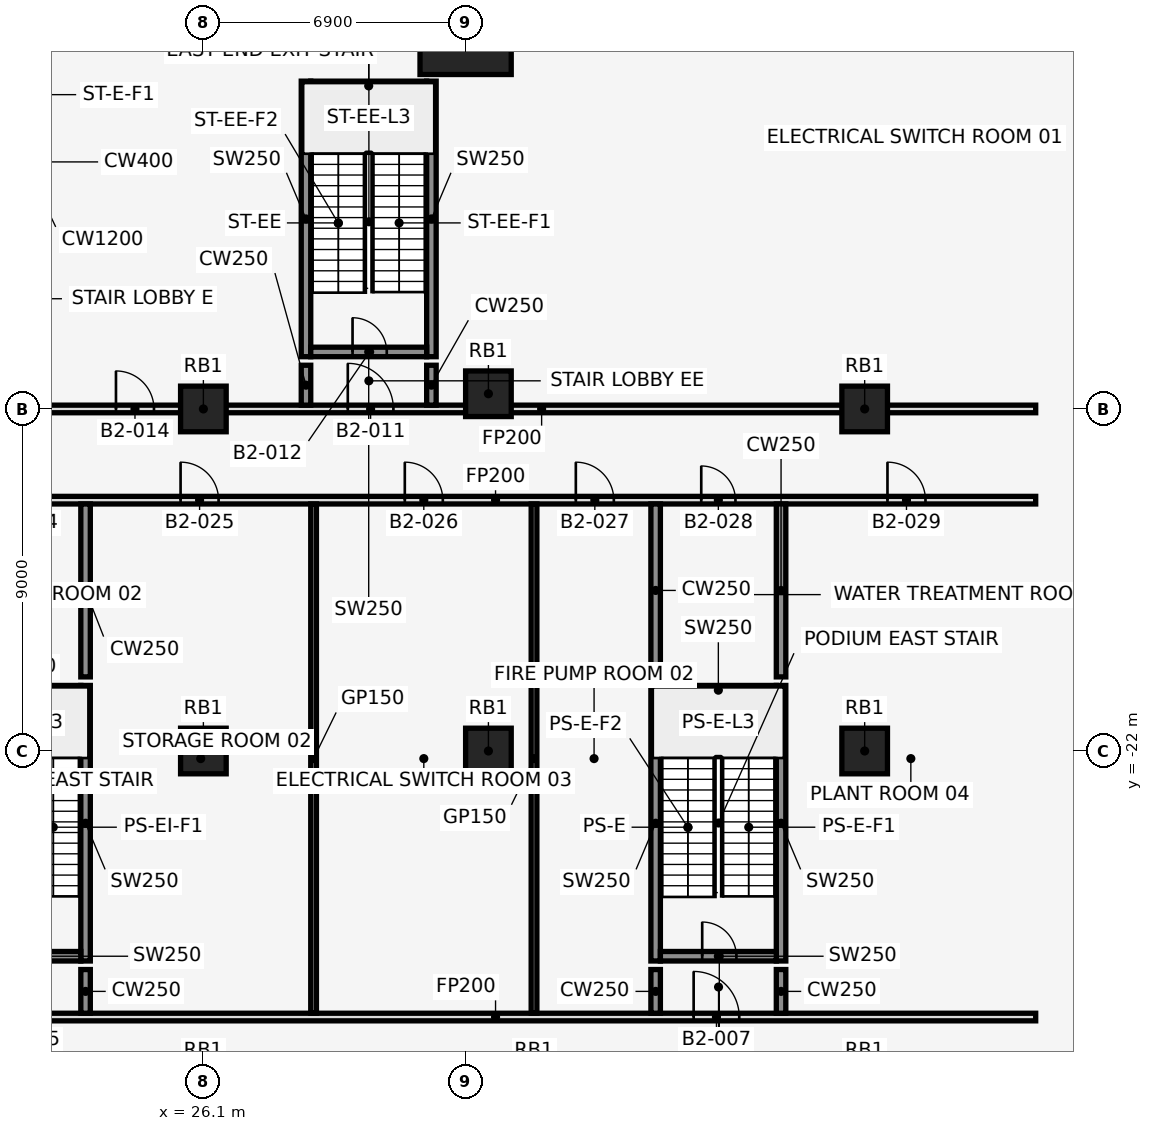
"""IFC4 building model, lengths in metres.
Left out: names, types, materials, properties, quantities, classifications, styles, units other than length and angle.
Written with IfcOpenShell. Run it as: python <this file> out.ifc"""

import sys

from ifc_helpers import new_model, si_unit, direction, frame, frame_2d, origin, origin_2d, place, context, subcontext, project, spatial, rectangle, extrude, element, fill, save


model = new_model("IFC4")
c1 = context("Model", 3, precision=1e-05, world=origin(), true_north=direction((0.0, 1.0)))
c2 = subcontext(c1, "Body", "Model", "MODEL_VIEW")
j1 = project(units=[si_unit("LENGTHUNIT", "METRE"), si_unit("PLANEANGLEUNIT", "RADIAN")], contexts=[c1])
p1 = place(None, origin())
s1 = spatial("IfcSite", under=j1, at=p1, CompositionType="ELEMENT")
p2 = place(p1, origin())
s2 = spatial("IfcBuilding", under=s1, at=p2, CompositionType="ELEMENT")
p3 = place(p2, frame((0.0, 0.0, -10.0)))
s3 = spatial("IfcBuildingStorey", under=s2, at=p3, CompositionType="ELEMENT", Elevation=-10.0)
p4 = place(p3, frame((33.0, -3.0, 0.0), z_axis=(0.0, 0.0, 1.0), x_axis=(1.0, 0.0, 0.0)))
e1 = element("IfcColumn", 1, at=p4, inside=s3, PredefinedType="COLUMN", context=c2, shape_type="SweptSolid", body=[
    extrude(rectangle(XDim=2.4, YDim=2.4, at=origin_2d()), origin(), (0.0, 0.0, 1.0), 5.0),
])
for number, where, z_axis, x_axis in (
    (2, (33.6, -12.6, 0.0), (0.0, 0.0, 1.0), (1.0, 0.0, 0.0)),
    (3, (33.6, -22.0, 0.0), (0.0, 0.0, 1.0), (1.0, 0.0, 0.0)),
    (4, (26.1, -22.0, 0.0), (0.0, 0.0, 1.0), (1.0, 0.0, 0.0)),
    (5, (26.1, -13.0, 0.0), (0.0, 0.0, 1.0), (1.0, 0.0, 0.0)),
    (6, (43.5, -13.0, 0.0), (0.0, 0.0, 1.0), (1.0, 0.0, 0.0)),
    (7, (43.5, -22.0, 0.0), (0.0, 0.0, 1.0), (1.0, 0.0, 0.0)),
):
    element("IfcColumn", number, at=place(p3, frame(where, z_axis=z_axis, x_axis=x_axis)), inside=s3, PredefinedType="COLUMN", context=c2, shape_type="SweptSolid", body=[
        extrude(rectangle(XDim=1.2, YDim=1.2, at=origin_2d()), origin(), (0.0, 0.0, 1.0), 5.0),
    ])
for number, where, z_axis, x_axis in (
    (8, (28.8, -11.625, 0.0), (0.0, 0.0, 1.0), (0.0, 1.0, 0.0)),
    (9, (32.1, -11.625, 0.0), (0.0, 0.0, 1.0), (0.0, 1.0, 0.0)),
):
    element("IfcWall", number, at=place(p3, frame(where, z_axis=z_axis, x_axis=x_axis)), inside=s3, PredefinedType="SHEAR", context=c2, shape_type="SweptSolid", body=[
        extrude(rectangle(XDim=7.25, YDim=0.25, at=frame_2d((3.625, 0.0))), origin(), (0.0, 0.0, 1.0), 5.0),
    ])
p5 = place(p3, frame((28.925, -11.5, 0.0), z_axis=(0.0, 0.0, 1.0), x_axis=(1.0, 0.0, 0.0)))
e10 = element("IfcWall", 10, at=p5, inside=s3, PredefinedType="SHEAR", context=c2, shape_type="SweptSolid", body=[
    extrude(rectangle(XDim=3.05, YDim=0.25, at=frame_2d((1.525, 0.0))), origin(), (0.0, 0.0, 1.0), 5.0),
])
p6 = place(p5, frame((1.1, 0.0, 0.0)))
e11 = element("IfcOpeningElement", 11, at=p6, cuts=e10, PredefinedType="OPENING", context=c2, shape_type="SweptSolid", body=[
    extrude(rectangle(XDim=0.9, YDim=2.1, at=frame_2d((0.45, 1.05))), frame((0.0, 0.137, 0.0), z_axis=(0.0, -1.0, 0.0), x_axis=(1.0, 0.0, 0.0)), (0.0, 0.0, 1.0), 0.274),
])
p7 = place(p3, frame((28.925, -4.5, 0.0), z_axis=(0.0, 0.0, 1.0), x_axis=(1.0, 0.0, 0.0)))
e12 = element("IfcWall", 12, at=p7, inside=s3, PredefinedType="SHEAR", context=c2, shape_type="SweptSolid", body=[
    extrude(rectangle(XDim=3.05, YDim=0.25, at=frame_2d((1.525, 0.0))), origin(), (0.0, 0.0, 1.0), 5.0),
])
p8 = place(p3, frame((23.0, -27.525, 0.0), z_axis=(0.0, 0.0, 1.0), x_axis=(0.0, 1.0, 0.0)))
e13 = element("IfcWall", 13, at=p8, inside=s3, PredefinedType="SHEAR", context=c2, shape_type="SweptSolid", body=[
    extrude(rectangle(XDim=7.25, YDim=0.25, at=frame_2d((3.625, 0.0))), origin(), (0.0, 0.0, 1.0), 5.0),
])
p9 = place(p3, frame((19.825, -27.4, 0.0), z_axis=(0.0, 0.0, 1.0), x_axis=(1.0, 0.0, 0.0)))
e14 = element("IfcWall", 14, at=p9, inside=s3, PredefinedType="SHEAR", context=c2, shape_type="SweptSolid", body=[
    extrude(rectangle(XDim=3.05, YDim=0.25, at=frame_2d((1.525, 0.0))), origin(), (0.0, 0.0, 1.0), 5.0),
])
p10 = place(p9, frame((1.1, 0.0, 0.0)))
e15 = element("IfcOpeningElement", 15, at=p10, cuts=e14, PredefinedType="OPENING", context=c2, shape_type="SweptSolid", body=[
    extrude(rectangle(XDim=0.9, YDim=2.1, at=frame_2d((0.45, 1.05))), frame((0.0, 0.137, 0.0), z_axis=(0.0, -1.0, 0.0), x_axis=(1.0, 0.0, 0.0)), (0.0, 0.0, 1.0), 0.274),
])
p11 = place(p3, frame((19.825, -20.4, 0.0), z_axis=(0.0, 0.0, 1.0), x_axis=(1.0, 0.0, 0.0)))
e16 = element("IfcWall", 16, at=p11, inside=s3, PredefinedType="SHEAR", context=c2, shape_type="SweptSolid", body=[
    extrude(rectangle(XDim=3.05, YDim=0.25, at=frame_2d((1.525, 0.0))), origin(), (0.0, 0.0, 1.0), 5.0),
])
for number, where, z_axis, x_axis in (
    (17, (38.0, -27.525, 0.0), (0.0, 0.0, 1.0), (0.0, 1.0, 0.0)),
    (18, (41.3, -27.525, 0.0), (0.0, 0.0, 1.0), (0.0, 1.0, 0.0)),
):
    element("IfcWall", number, at=place(p3, frame(where, z_axis=z_axis, x_axis=x_axis)), inside=s3, PredefinedType="SHEAR", context=c2, shape_type="SweptSolid", body=[
        extrude(rectangle(XDim=7.25, YDim=0.25, at=frame_2d((3.625, 0.0))), origin(), (0.0, 0.0, 1.0), 5.0),
    ])
p12 = place(p3, frame((38.125, -27.4, 0.0), z_axis=(0.0, 0.0, 1.0), x_axis=(1.0, 0.0, 0.0)))
e19 = element("IfcWall", 19, at=p12, inside=s3, PredefinedType="SHEAR", context=c2, shape_type="SweptSolid", body=[
    extrude(rectangle(XDim=3.05, YDim=0.25, at=frame_2d((1.525, 0.0))), origin(), (0.0, 0.0, 1.0), 5.0),
])
p13 = place(p12, frame((1.1, 0.0, 0.0)))
e20 = element("IfcOpeningElement", 20, at=p13, cuts=e19, PredefinedType="OPENING", context=c2, shape_type="SweptSolid", body=[
    extrude(rectangle(XDim=0.9, YDim=2.1, at=frame_2d((0.45, 1.05))), frame((0.0, 0.137, 0.0), z_axis=(0.0, -1.0, 0.0), x_axis=(1.0, 0.0, 0.0)), (0.0, 0.0, 1.0), 0.274),
])
p14 = place(p3, frame((38.125, -20.4, 0.0), z_axis=(0.0, 0.0, 1.0), x_axis=(1.0, 0.0, 0.0)))
e21 = element("IfcWall", 21, at=p14, inside=s3, PredefinedType="SHEAR", context=c2, shape_type="SweptSolid", body=[
    extrude(rectangle(XDim=3.05, YDim=0.25, at=frame_2d((1.525, 0.0))), origin(), (0.0, 0.0, 1.0), 5.0),
])
p15 = place(p3, frame((19.575, -29.0, 0.0), z_axis=(0.0, 0.0, 1.0), x_axis=(1.0, 0.0, 0.0)))
e22 = element("IfcWall", 22, at=p15, inside=s3, PredefinedType="PARTITIONING", context=c2, shape_type="SweptSolid", body=[
    extrude(rectangle(XDim=28.425, YDim=0.2, at=frame_2d((14.212, 0.0))), origin(), (0.0, 0.0, 1.0), 4.7),
])
p16 = place(p15, frame((1.225, 0.0, 0.0)))
e23 = element("IfcOpeningElement", 23, at=p16, cuts=e22, PredefinedType="OPENING", context=c2, shape_type="SweptSolid", body=[
    extrude(rectangle(XDim=1.2, YDim=2.1, at=frame_2d((0.6, 1.05))), frame((0.0, 0.112, 0.0), z_axis=(0.0, -1.0, 0.0), x_axis=(1.0, 0.0, 0.0)), (0.0, 0.0, 1.0), 0.224),
])
p17 = place(p15, frame((19.425, 0.0, 0.0)))
e24 = element("IfcOpeningElement", 24, at=p17, cuts=e22, PredefinedType="OPENING", context=c2, shape_type="SweptSolid", body=[
    extrude(rectangle(XDim=1.2, YDim=2.1, at=frame_2d((0.6, 1.05))), frame((0.0, 0.112, 0.0), z_axis=(0.0, -1.0, 0.0), x_axis=(1.0, 0.0, 0.0)), (0.0, 0.0, 1.0), 0.224),
])
p18 = place(p3, frame((19.575, -15.4, 0.0), z_axis=(0.0, 0.0, 1.0), x_axis=(1.0, 0.0, 0.0)))
e25 = element("IfcWall", 25, at=p18, inside=s3, PredefinedType="PARTITIONING", context=c2, shape_type="SweptSolid", body=[
    extrude(rectangle(XDim=28.425, YDim=0.2, at=frame_2d((14.212, 0.0))), origin(), (0.0, 0.0, 1.0), 4.7),
])
p19 = place(p18, frame((1.325, 0.0, 0.0)))
e26 = element("IfcOpeningElement", 26, at=p19, cuts=e25, PredefinedType="OPENING", context=c2, shape_type="SweptSolid", body=[
    extrude(rectangle(XDim=0.9, YDim=2.1, at=frame_2d((0.45, 1.05))), frame((0.0, 0.112, 0.0), z_axis=(0.0, -1.0, 0.0), x_axis=(1.0, 0.0, 0.0)), (0.0, 0.0, 1.0), 0.224),
])
p20 = place(p18, frame((5.925, 0.0, 0.0)))
e27 = element("IfcOpeningElement", 27, at=p20, cuts=e25, PredefinedType="OPENING", context=c2, shape_type="SweptSolid", body=[
    extrude(rectangle(XDim=1.0, YDim=2.1, at=frame_2d((0.5, 1.05))), frame((0.0, 0.112, 0.0), z_axis=(0.0, -1.0, 0.0), x_axis=(1.0, 0.0, 0.0)), (0.0, 0.0, 1.0), 0.224),
])
p21 = place(p18, frame((11.825, 0.0, 0.0)))
e28 = element("IfcOpeningElement", 28, at=p21, cuts=e25, PredefinedType="OPENING", context=c2, shape_type="SweptSolid", body=[
    extrude(rectangle(XDim=1.0, YDim=2.1, at=frame_2d((0.5, 1.05))), frame((0.0, 0.112, 0.0), z_axis=(0.0, -1.0, 0.0), x_axis=(1.0, 0.0, 0.0)), (0.0, 0.0, 1.0), 0.224),
])
p22 = place(p18, frame((16.325, 0.0, 0.0)))
e29 = element("IfcOpeningElement", 29, at=p22, cuts=e25, PredefinedType="OPENING", context=c2, shape_type="SweptSolid", body=[
    extrude(rectangle(XDim=1.0, YDim=2.1, at=frame_2d((0.5, 1.05))), frame((0.0, 0.112, 0.0), z_axis=(0.0, -1.0, 0.0), x_axis=(1.0, 0.0, 0.0)), (0.0, 0.0, 1.0), 0.224),
])
p23 = place(p18, frame((19.625, 0.0, 0.0)))
e30 = element("IfcOpeningElement", 30, at=p23, cuts=e25, PredefinedType="OPENING", context=c2, shape_type="SweptSolid", body=[
    extrude(rectangle(XDim=0.9, YDim=2.1, at=frame_2d((0.45, 1.05))), frame((0.0, 0.112, 0.0), z_axis=(0.0, -1.0, 0.0), x_axis=(1.0, 0.0, 0.0)), (0.0, 0.0, 1.0), 0.224),
])
p24 = place(p18, frame((24.525, 0.0, 0.0)))
e31 = element("IfcOpeningElement", 31, at=p24, cuts=e25, PredefinedType="OPENING", context=c2, shape_type="SweptSolid", body=[
    extrude(rectangle(XDim=1.0, YDim=2.1, at=frame_2d((0.5, 1.05))), frame((0.0, 0.112, 0.0), z_axis=(0.0, -1.0, 0.0), x_axis=(1.0, 0.0, 0.0)), (0.0, 0.0, 1.0), 0.224),
])
p25 = place(p3, frame((22.0, -13.0, 0.0), z_axis=(0.0, 0.0, 1.0), x_axis=(1.0, 0.0, 0.0)))
e32 = element("IfcWall", 32, at=p25, inside=s3, PredefinedType="PARTITIONING", context=c2, shape_type="SweptSolid", body=[
    extrude(rectangle(XDim=26.0, YDim=0.2, at=frame_2d((13.0, 0.0))), origin(), (0.0, 0.0, 1.0), 4.7),
])
p26 = place(p25, frame((7.9, 0.0, 0.0)))
e33 = element("IfcOpeningElement", 33, at=p26, cuts=e32, PredefinedType="OPENING", context=c2, shape_type="SweptSolid", body=[
    extrude(rectangle(XDim=1.2, YDim=2.1, at=frame_2d((0.6, 1.05))), frame((0.0, 0.112, 0.0), z_axis=(0.0, -1.0, 0.0), x_axis=(1.0, 0.0, 0.0)), (0.0, 0.0, 1.0), 0.224),
])
p27 = place(p25, frame((1.8, 0.0, 0.0)))
e34 = element("IfcOpeningElement", 34, at=p27, cuts=e32, PredefinedType="OPENING", context=c2, shape_type="SweptSolid", body=[
    extrude(rectangle(XDim=1.0, YDim=2.1, at=frame_2d((0.5, 1.05))), frame((0.0, 0.112, 0.0), z_axis=(0.0, -1.0, 0.0), x_axis=(1.0, 0.0, 0.0)), (0.0, 0.0, 1.0), 0.224),
])
p28 = place(p3, frame((23.0, -28.9, 0.0), z_axis=(0.0, 0.0, 1.0), x_axis=(0.0, 1.0, 0.0)))
e35 = element("IfcWall", 35, at=p28, inside=s3, PredefinedType="SHEAR", context=c2, shape_type="SweptSolid", body=[
    extrude(rectangle(XDim=1.15, YDim=0.25, at=frame_2d((0.575, 0.0))), origin(), (0.0, 0.0, 1.0), 5.0),
])
p29 = place(p3, frame((23.0, -20.05, 0.0), z_axis=(0.0, 0.0, 1.0), x_axis=(0.0, 1.0, 0.0)))
e36 = element("IfcWall", 36, at=p29, inside=s3, PredefinedType="SHEAR", context=c2, shape_type="SweptSolid", body=[
    extrude(rectangle(XDim=4.55, YDim=0.25, at=frame_2d((2.275, 0.0))), origin(), (0.0, 0.0, 1.0), 5.0),
])
p30 = place(p3, frame((28.8, -12.9, 0.0), z_axis=(0.0, 0.0, 1.0), x_axis=(0.0, 1.0, 0.0)))
e37 = element("IfcWall", 37, at=p30, inside=s3, PredefinedType="SHEAR", context=c2, shape_type="SweptSolid", body=[
    extrude(rectangle(XDim=1.05, YDim=0.25, at=frame_2d((0.525, 0.0))), origin(), (0.0, 0.0, 1.0), 5.0),
])
p31 = place(p3, frame((29.0, -28.9, 0.0), z_axis=(0.0, 0.0, 1.0), x_axis=(0.0, 1.0, 0.0)))
e38 = element("IfcWall", 38, at=p31, inside=s3, PredefinedType="PARTITIONING", context=c2, shape_type="SweptSolid", body=[
    extrude(rectangle(XDim=13.4, YDim=0.15, at=frame_2d((6.7, 0.0))), origin(), (0.0, 0.0, 1.0), 4.7),
])
p32 = place(p3, frame((32.1, -12.9, 0.0), z_axis=(0.0, 0.0, 1.0), x_axis=(0.0, 1.0, 0.0)))
e39 = element("IfcWall", 39, at=p32, inside=s3, PredefinedType="SHEAR", context=c2, shape_type="SweptSolid", body=[
    extrude(rectangle(XDim=1.05, YDim=0.25, at=frame_2d((0.525, 0.0))), origin(), (0.0, 0.0, 1.0), 5.0),
])
p33 = place(p3, frame((34.8, -28.9, 0.0), z_axis=(0.0, 0.0, 1.0), x_axis=(0.0, 1.0, 0.0)))
e40 = element("IfcWall", 40, at=p33, inside=s3, PredefinedType="PARTITIONING", context=c2, shape_type="SweptSolid", body=[
    extrude(rectangle(XDim=13.4, YDim=0.15, at=frame_2d((6.7, 0.0))), origin(), (0.0, 0.0, 1.0), 4.7),
])
p34 = place(p3, frame((38.0, -28.9, 0.0), z_axis=(0.0, 0.0, 1.0), x_axis=(0.0, 1.0, 0.0)))
e41 = element("IfcWall", 41, at=p34, inside=s3, PredefinedType="SHEAR", context=c2, shape_type="SweptSolid", body=[
    extrude(rectangle(XDim=1.15, YDim=0.25, at=frame_2d((0.575, 0.0))), origin(), (0.0, 0.0, 1.0), 5.0),
])
p35 = place(p3, frame((38.0, -20.05, 0.0), z_axis=(0.0, 0.0, 1.0), x_axis=(0.0, 1.0, 0.0)))
e42 = element("IfcWall", 42, at=p35, inside=s3, PredefinedType="SHEAR", context=c2, shape_type="SweptSolid", body=[
    extrude(rectangle(XDim=4.55, YDim=0.25, at=frame_2d((2.275, 0.0))), origin(), (0.0, 0.0, 1.0), 5.0),
])
p36 = place(p3, frame((41.3, -28.9, 0.0), z_axis=(0.0, 0.0, 1.0), x_axis=(0.0, 1.0, 0.0)))
e43 = element("IfcWall", 43, at=p36, inside=s3, PredefinedType="SHEAR", context=c2, shape_type="SweptSolid", body=[
    extrude(rectangle(XDim=1.15, YDim=0.25, at=frame_2d((0.575, 0.0))), origin(), (0.0, 0.0, 1.0), 5.0),
])
p37 = place(p3, frame((41.3, -20.05, 0.0), z_axis=(0.0, 0.0, 1.0), x_axis=(0.0, 1.0, 0.0)))
e44 = element("IfcWall", 44, at=p37, inside=s3, PredefinedType="SHEAR", context=c2, shape_type="SweptSolid", body=[
    extrude(rectangle(XDim=4.55, YDim=0.25, at=frame_2d((2.275, 0.0))), origin(), (0.0, 0.0, 1.0), 5.0),
])
p38 = place(p17, origin())
e45 = element("IfcDoor", 45, at=p38, inside=s3, OperationType="SINGLE_SWING_LEFT", PredefinedType="DOOR", context=c2, shape_type="SweptSolid", body=[
    extrude(rectangle(XDim=1.2, YDim=2.1, at=frame_2d((0.6, 1.05))), frame((0.0, 0.025, 0.0), z_axis=(0.0, -1.0, 0.0), x_axis=(1.0, 0.0, 0.0)), (0.0, 0.0, 1.0), 0.05),
])
fill(e24, e45)
p39 = place(p13, origin())
e46 = element("IfcDoor", 46, at=p39, inside=s3, OperationType="SINGLE_SWING_LEFT", PredefinedType="DOOR", context=c2, shape_type="SweptSolid", body=[
    extrude(rectangle(XDim=0.9, YDim=2.1, at=frame_2d((0.45, 1.05))), frame((0.0, 0.025, 0.0), z_axis=(0.0, -1.0, 0.0), x_axis=(1.0, 0.0, 0.0)), (0.0, 0.0, 1.0), 0.05),
])
fill(e20, e46)
p40 = place(p26, origin())
e47 = element("IfcDoor", 47, at=p40, inside=s3, OperationType="SINGLE_SWING_LEFT", PredefinedType="DOOR", context=c2, shape_type="SweptSolid", body=[
    extrude(rectangle(XDim=1.2, YDim=2.1, at=frame_2d((0.6, 1.05))), frame((0.0, 0.025, 0.0), z_axis=(0.0, -1.0, 0.0), x_axis=(1.0, 0.0, 0.0)), (0.0, 0.0, 1.0), 0.05),
])
fill(e33, e47)
p41 = place(p6, origin())
e48 = element("IfcDoor", 48, at=p41, inside=s3, OperationType="SINGLE_SWING_RIGHT", PredefinedType="DOOR", context=c2, shape_type="SweptSolid", body=[
    extrude(rectangle(XDim=0.9, YDim=2.1, at=frame_2d((0.45, 1.05))), frame((0.0, 0.025, 0.0), z_axis=(0.0, -1.0, 0.0), x_axis=(1.0, 0.0, 0.0)), (0.0, 0.0, 1.0), 0.05),
])
fill(e11, e48)
p42 = place(p27, origin())
e49 = element("IfcDoor", 49, at=p42, inside=s3, OperationType="SINGLE_SWING_LEFT", PredefinedType="DOOR", context=c2, shape_type="SweptSolid", body=[
    extrude(rectangle(XDim=1.0, YDim=2.1, at=frame_2d((0.5, 1.05))), frame((0.0, 0.025, 0.0), z_axis=(0.0, -1.0, 0.0), x_axis=(1.0, 0.0, 0.0)), (0.0, 0.0, 1.0), 0.05),
])
fill(e34, e49)
p43 = place(p20, frame((1.0, 0.0, 0.0), z_axis=(0.0, 0.0, 1.0), x_axis=(-1.0, 0.0, 0.0)))
e50 = element("IfcDoor", 50, at=p43, inside=s3, OperationType="SINGLE_SWING_LEFT", PredefinedType="DOOR", context=c2, shape_type="SweptSolid", body=[
    extrude(rectangle(XDim=1.0, YDim=2.1, at=frame_2d((0.5, 1.05))), frame((0.0, 0.025, 0.0), z_axis=(0.0, -1.0, 0.0), x_axis=(1.0, 0.0, 0.0)), (0.0, 0.0, 1.0), 0.05),
])
fill(e27, e50)
p44 = place(p21, frame((1.0, 0.0, 0.0), z_axis=(0.0, 0.0, 1.0), x_axis=(-1.0, 0.0, 0.0)))
e51 = element("IfcDoor", 51, at=p44, inside=s3, OperationType="SINGLE_SWING_RIGHT", PredefinedType="DOOR", context=c2, shape_type="SweptSolid", body=[
    extrude(rectangle(XDim=1.0, YDim=2.1, at=frame_2d((0.5, 1.05))), frame((0.0, 0.025, 0.0), z_axis=(0.0, -1.0, 0.0), x_axis=(1.0, 0.0, 0.0)), (0.0, 0.0, 1.0), 0.05),
])
fill(e28, e51)
p45 = place(p22, frame((1.0, 0.0, 0.0), z_axis=(0.0, 0.0, 1.0), x_axis=(-1.0, 0.0, 0.0)))
e52 = element("IfcDoor", 52, at=p45, inside=s3, OperationType="SINGLE_SWING_RIGHT", PredefinedType="DOOR", context=c2, shape_type="SweptSolid", body=[
    extrude(rectangle(XDim=1.0, YDim=2.1, at=frame_2d((0.5, 1.05))), frame((0.0, 0.025, 0.0), z_axis=(0.0, -1.0, 0.0), x_axis=(1.0, 0.0, 0.0)), (0.0, 0.0, 1.0), 0.05),
])
fill(e29, e52)
p46 = place(p23, frame((0.9, 0.0, 0.0), z_axis=(0.0, 0.0, 1.0), x_axis=(-1.0, 0.0, 0.0)))
e53 = element("IfcDoor", 53, at=p46, inside=s3, OperationType="SINGLE_SWING_LEFT", PredefinedType="DOOR", context=c2, shape_type="SweptSolid", body=[
    extrude(rectangle(XDim=0.9, YDim=2.1, at=frame_2d((0.45, 1.05))), frame((0.0, 0.025, 0.0), z_axis=(0.0, -1.0, 0.0), x_axis=(1.0, 0.0, 0.0)), (0.0, 0.0, 1.0), 0.05),
])
fill(e30, e53)
p47 = place(p24, frame((1.0, 0.0, 0.0), z_axis=(0.0, 0.0, 1.0), x_axis=(-1.0, 0.0, 0.0)))
e54 = element("IfcDoor", 54, at=p47, inside=s3, OperationType="SINGLE_SWING_RIGHT", PredefinedType="DOOR", context=c2, shape_type="SweptSolid", body=[
    extrude(rectangle(XDim=1.0, YDim=2.1, at=frame_2d((0.5, 1.05))), frame((0.0, 0.025, 0.0), z_axis=(0.0, -1.0, 0.0), x_axis=(1.0, 0.0, 0.0)), (0.0, 0.0, 1.0), 0.05),
])
fill(e31, e54)
save(model, sys.argv[1])
